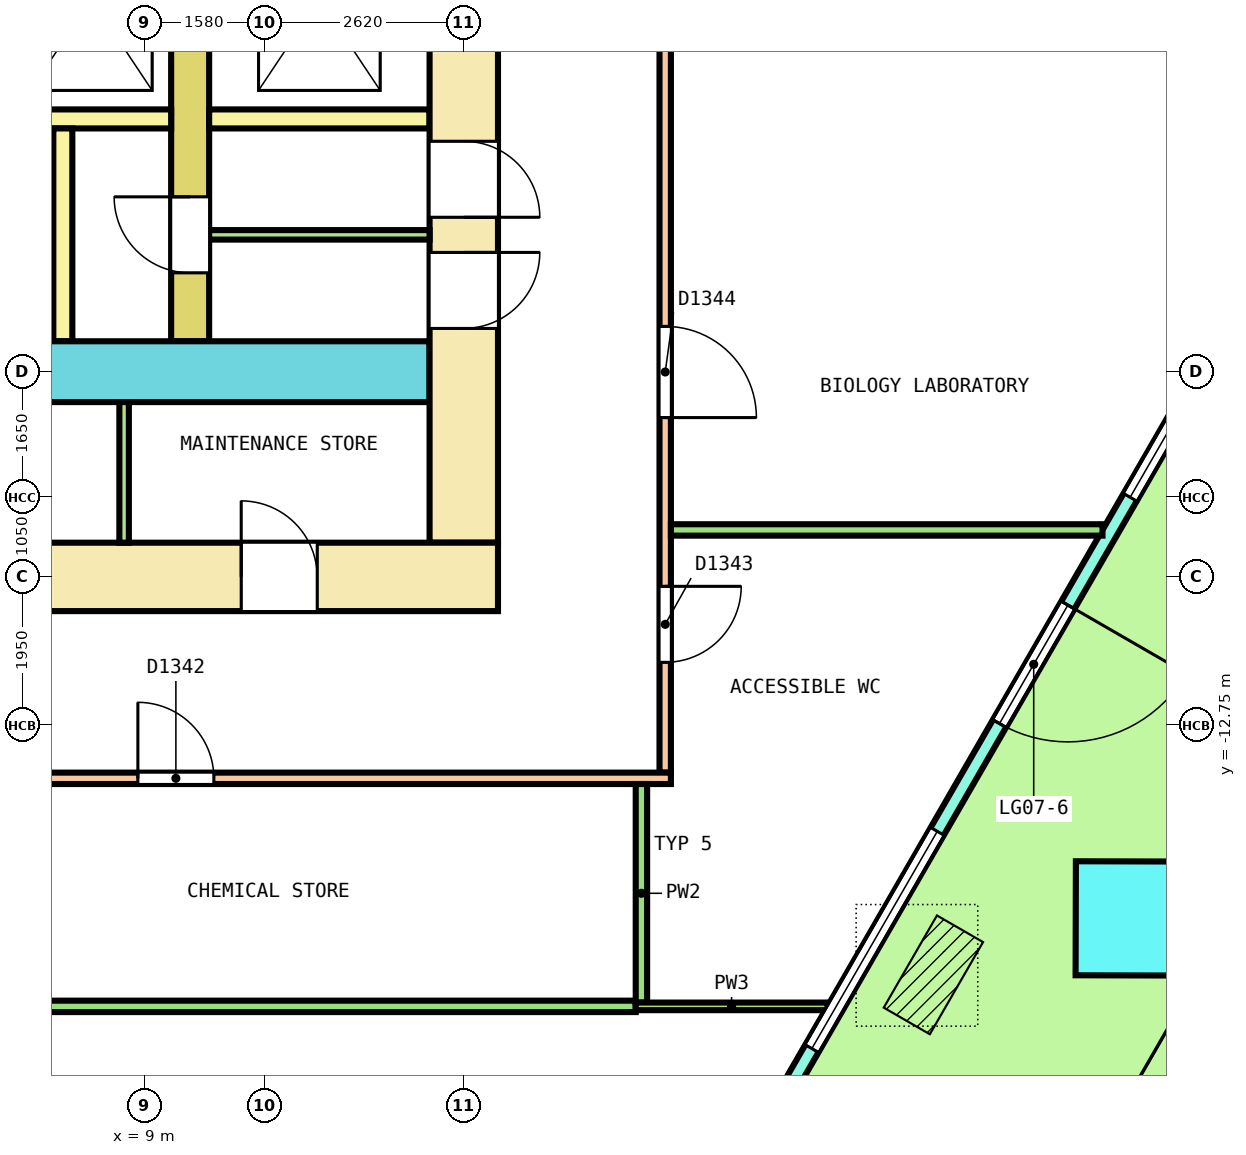
"""IFC4 building model, lengths in metres.
Left out: names, types, materials, properties, quantities, classifications, styles, units other than length and angle.
Written with IfcOpenShell. Run it as: python <this file> out.ifc"""

import sys

from ifc_helpers import new_model, si_unit, direction, frame, frame_2d, origin, origin_2d, place, context, subcontext, project, spatial, polyline, rectangle, outline, extrude, element, fill, save


model = new_model("IFC4")
c1 = context("Model", 3, precision=1e-05, world=origin(), true_north=direction((0.0, 1.0)))
c2 = subcontext(c1, "Body", "Model", "MODEL_VIEW")
j1 = project(units=[si_unit("LENGTHUNIT", "METRE"), si_unit("PLANEANGLEUNIT", "RADIAN")], contexts=[c1])
p1 = place(None, origin())
s1 = spatial("IfcSite", under=j1, at=p1, CompositionType="ELEMENT")
p2 = place(p1, origin())
s2 = spatial("IfcBuilding", under=s1, at=p2, CompositionType="ELEMENT")
p3 = place(p2, frame((0.0, 0.0, 32.2)))
s3 = spatial("IfcBuildingStorey", under=s2, at=p3, CompositionType="ELEMENT", Elevation=32.2)
p4 = place(p3, frame((22.001, -15.293, 0.0), z_axis=(-0.003616759812, -0.006269050341, 0.999973808685), x_axis=(0.501883236828, 0.864905101718, 0.007237514304)))
e1 = element("IfcColumn", 1, at=p4, inside=s3, PredefinedType="COLUMN", context=c2, shape_type="SweptSolid", body=[
    extrude(rectangle(XDim=1.5, YDim=1.5, at=origin_2d()), origin(), (0.0, 0.0, 1.0), 4.05),
])
p5 = place(p3, frame((15.464, -21.016, 0.0), z_axis=(0.0, 0.0, 1.0), x_axis=(0.499999366442, 0.866025769569, 0.0)))
e2 = element("IfcWall", 2, at=p5, inside=s3, PredefinedType="SOLIDWALL", context=c2, shape_type="SweptSolid", body=[
    extrude(outline(polyline([(-0.027, -0.1), (1.023, -0.1), (2.072, -0.1), (3.122, -0.1), (4.171, -0.1), (5.221, -0.1), (6.27, -0.1), (7.32, -0.1), (8.369, -0.1), (9.419, -0.1), (10.468, -0.1), (11.518, -0.1), (12.567, -0.1), (13.617, -0.1), (14.666, -0.1), (15.716, -0.1), (16.765, -0.1), (17.815, -0.1), (18.864, -0.1), (19.914, -0.1), (20.963, -0.1), (20.91, 0.1), (19.865, 0.1), (18.821, 0.1), (17.777, 0.1), (16.733, 0.1), (15.689, 0.1), (14.645, 0.1), (13.601, 0.1), (12.557, 0.1), (11.512, 0.1), (10.468, 0.1), (9.424, 0.1), (8.38, 0.1), (7.336, 0.1), (6.292, 0.1), (5.248, 0.1), (4.203, 0.1), (3.159, 0.1), (2.115, 0.1), (1.071, 0.1), (0.027, 0.1), (-0.027, -0.1)])), origin(), (0.0, 0.0, 1.0), 4.1),
])
p6 = place(p5, frame((0.444, 0.0, 0.1)))
e3 = element("IfcOpeningElement", 3, at=p6, cuts=e2, PredefinedType="OPENING", context=c2, shape_type="SweptSolid", body=[
    extrude(rectangle(XDim=3.3, YDim=2.9, at=frame_2d((1.65, 1.45))), frame((0.0, 0.11, 0.0), z_axis=(0.0, -1.0, 0.0), x_axis=(1.0, 0.0, 0.0)), (0.0, 0.0, 1.0), 0.22),
])
p7 = place(p5, frame((4.631, 0.0, 0.1)))
e4 = element("IfcOpeningElement", 4, at=p7, cuts=e2, PredefinedType="OPENING", context=c2, shape_type="SweptSolid", body=[
    extrude(rectangle(XDim=3.3, YDim=2.9, at=frame_2d((1.65, 1.45))), frame((0.0, 0.11, 0.0), z_axis=(0.0, -1.0, 0.0), x_axis=(1.0, 0.0, 0.0)), (0.0, 0.0, 1.0), 0.22),
])
p8 = place(p5, frame((9.568, 0.0, 0.0)))
e5 = element("IfcOpeningElement", 5, at=p8, cuts=e2, PredefinedType="OPENING", context=c2, shape_type="SweptSolid", body=[
    extrude(rectangle(XDim=1.8, YDim=2.4, at=frame_2d((0.9, 1.2))), frame((0.0, 0.11, 0.0), z_axis=(0.0, -1.0, 0.0), x_axis=(1.0, 0.0, 0.0)), (0.0, 0.0, 1.0), 0.22),
])
p9 = place(p5, frame((9.568, 0.0, 2.55)))
e6 = element("IfcOpeningElement", 6, at=p9, cuts=e2, PredefinedType="OPENING", context=c2, shape_type="SweptSolid", body=[
    extrude(rectangle(XDim=1.8, YDim=0.45, at=frame_2d((0.9, 0.225))), frame((0.0, 0.11, 0.0), z_axis=(0.0, -1.0, 0.0), x_axis=(1.0, 0.0, 0.0)), (0.0, 0.0, 1.0), 0.22),
])
p10 = place(p5, frame((13.006, 0.0, 0.1)))
e7 = element("IfcOpeningElement", 7, at=p10, cuts=e2, PredefinedType="OPENING", context=c2, shape_type="SweptSolid", body=[
    extrude(rectangle(XDim=3.3, YDim=2.9, at=frame_2d((1.65, 1.45))), frame((0.0, 0.11, 0.0), z_axis=(0.0, -1.0, 0.0), x_axis=(1.0, 0.0, 0.0)), (0.0, 0.0, 1.0), 0.22),
])
p11 = place(p5, frame((17.193, 0.0, 0.1)))
e8 = element("IfcOpeningElement", 8, at=p11, cuts=e2, PredefinedType="OPENING", context=c2, shape_type="SweptSolid", body=[
    extrude(rectangle(XDim=3.3, YDim=2.9, at=frame_2d((1.65, 1.45))), frame((0.0, 0.11, 0.0), z_axis=(0.0, -1.0, 0.0), x_axis=(1.0, 0.0, 0.0)), (0.0, 0.0, 1.0), 0.22),
])
p12 = place(p3, frame((-13.65, -10.8, 0.0), z_axis=(0.0, 0.0, 1.0), x_axis=(1.0, 0.0, 0.0)))
e9 = element("IfcWall", 9, at=p12, inside=s3, PredefinedType="SHEAR", context=c2, shape_type="SweptSolid", body=[
    extrude(rectangle(XDim=27.3, YDim=0.9, at=frame_2d((13.65, 0.0))), origin(), (0.0, 0.0, 1.0), 4.1),
])
p13 = place(p12, frame((3.453, 0.0, 0.0)))
e10 = element("IfcOpeningElement", 10, at=p13, cuts=e9, PredefinedType="OPENING", context=c2, shape_type="SweptSolid", body=[
    extrude(rectangle(XDim=1.0, YDim=2.1, at=frame_2d((0.5, 1.05))), frame((0.0, 0.46, 0.0), z_axis=(0.0, -1.0, 0.0), x_axis=(1.0, 0.0, 0.0)), (0.0, 0.0, 1.0), 0.92),
])
p14 = place(p12, frame((9.653, 0.0, 0.0)))
e11 = element("IfcOpeningElement", 11, at=p14, cuts=e9, PredefinedType="OPENING", context=c2, shape_type="SweptSolid", body=[
    extrude(rectangle(XDim=1.0, YDim=2.1, at=frame_2d((0.5, 1.05))), frame((0.0, 0.46, 0.0), z_axis=(0.0, -1.0, 0.0), x_axis=(1.0, 0.0, 0.0)), (0.0, 0.0, 1.0), 0.92),
])
p15 = place(p12, frame((19.872, 0.0, 0.0)))
e12 = element("IfcOpeningElement", 12, at=p15, cuts=e9, PredefinedType="OPENING", context=c2, shape_type="SweptSolid", body=[
    extrude(rectangle(XDim=1.0, YDim=2.1, at=frame_2d((0.5, 1.05))), frame((0.0, 0.46, 0.0), z_axis=(0.0, -1.0, 0.0), x_axis=(1.0, 0.0, 0.0)), (0.0, 0.0, 1.0), 0.92),
])
p16 = place(p12, frame((23.922, 0.0, 0.0)))
e13 = element("IfcOpeningElement", 13, at=p16, cuts=e9, PredefinedType="OPENING", context=c2, shape_type="SweptSolid", body=[
    extrude(rectangle(XDim=1.0, YDim=2.1, at=frame_2d((0.5, 1.05))), frame((0.0, 0.46, 0.0), z_axis=(0.0, -1.0, 0.0), x_axis=(1.0, 0.0, 0.0)), (0.0, 0.0, 1.0), 0.92),
])
p17 = place(p12, frame((15.2, 0.0, 0.0)))
e14 = element("IfcOpeningElement", 14, at=p17, cuts=e9, PredefinedType="OPENING", context=c2, shape_type="SweptSolid", body=[
    extrude(rectangle(XDim=1.2, YDim=2.1, at=frame_2d((0.6, 1.05))), frame((0.0, 0.46, 0.0), z_axis=(0.0, -1.0, 0.0), x_axis=(1.0, 0.0, 0.0)), (0.0, 0.0, 1.0), 0.92),
])
p18 = place(p3, frame((13.2, -10.35, 0.0), z_axis=(0.0, 0.0, 1.0), x_axis=(0.0, 1.0, 0.0)))
e15 = element("IfcWall", 15, at=p18, inside=s3, PredefinedType="SHEAR", context=c2, shape_type="SweptSolid", body=[
    extrude(rectangle(XDim=20.7, YDim=0.9, at=frame_2d((10.35, 0.0))), origin(), (0.0, 0.0, 1.0), 4.1),
])
p19 = place(p18, frame((9.15, 0.0, 0.0)))
e16 = element("IfcOpeningElement", 16, at=p19, cuts=e15, PredefinedType="OPENING", context=c2, shape_type="SweptSolid", body=[
    extrude(rectangle(XDim=2.4, YDim=2.1, at=frame_2d((1.2, 1.05))), frame((0.0, 0.46, 0.0), z_axis=(0.0, -1.0, 0.0), x_axis=(1.0, 0.0, 0.0)), (0.0, 0.0, 1.0), 0.92),
])
p20 = place(p18, frame((16.05, 0.0, 0.0)))
e17 = element("IfcOpeningElement", 17, at=p20, cuts=e15, PredefinedType="OPENING", context=c2, shape_type="SweptSolid", body=[
    extrude(rectangle(XDim=1.2, YDim=2.1, at=frame_2d((0.6, 1.05))), frame((0.0, 0.46, 0.0), z_axis=(0.0, -1.0, 0.0), x_axis=(1.0, 0.0, 0.0)), (0.0, 0.0, 1.0), 0.92),
])
p21 = place(p18, frame((2.819, 0.0, 0.0)))
e18 = element("IfcOpeningElement", 18, at=p21, cuts=e15, PredefinedType="OPENING", context=c2, shape_type="SweptSolid", body=[
    extrude(rectangle(XDim=1.0, YDim=2.1, at=frame_2d((0.5, 1.05))), frame((0.0, 0.46, 0.0), z_axis=(0.0, -1.0, 0.0), x_axis=(1.0, 0.0, 0.0)), (0.0, 0.0, 1.0), 0.92),
])
p22 = place(p18, frame((4.281, 0.0, 0.0)))
e19 = element("IfcOpeningElement", 19, at=p22, cuts=e15, PredefinedType="OPENING", context=c2, shape_type="SweptSolid", body=[
    extrude(rectangle(XDim=1.0, YDim=2.1, at=frame_2d((0.5, 1.05))), frame((0.0, 0.46, 0.0), z_axis=(0.0, -1.0, 0.0), x_axis=(1.0, 0.0, 0.0)), (0.0, 0.0, 1.0), 0.92),
])
p23 = place(p3, frame((-12.75, -8.1, 0.0), z_axis=(0.0, 0.0, 1.0), x_axis=(1.0, 0.0, 0.0)))
e20 = element("IfcWall", 20, at=p23, inside=s3, PredefinedType="SHEAR", context=c2, shape_type="SweptSolid", body=[
    extrude(rectangle(XDim=25.5, YDim=0.8, at=frame_2d((12.75, 0.0))), origin(), (0.0, 0.0, 1.0), 4.1),
])
p24 = place(p23, frame((14.3, 0.0, 0.0)))
e21 = element("IfcOpeningElement", 21, at=p24, cuts=e20, PredefinedType="OPENING", context=c2, shape_type="SweptSolid", body=[
    extrude(rectangle(XDim=1.2, YDim=2.1, at=frame_2d((0.6, 1.05))), frame((0.0, 0.41, 0.0), z_axis=(0.0, -1.0, 0.0), x_axis=(1.0, 0.0, 0.0)), (0.0, 0.0, 1.0), 0.82),
])
p25 = place(p3, frame((9.6, -7.7, 0.0), z_axis=(0.0, 0.0, 1.0), x_axis=(0.0, 1.0, 0.0)))
e22 = element("IfcWall", 22, at=p25, inside=s3, PredefinedType="SHEAR", context=c2, shape_type="SweptSolid", body=[
    extrude(rectangle(XDim=15.4, YDim=0.5, at=frame_2d((7.7, 0.0))), origin(), (0.0, 0.0, 1.0), 4.1),
])
p26 = place(p25, frame((6.5, 0.0, 0.0)))
e23 = element("IfcOpeningElement", 23, at=p26, cuts=e22, PredefinedType="OPENING", context=c2, shape_type="SweptSolid", body=[
    extrude(rectangle(XDim=2.4, YDim=2.1, at=frame_2d((1.2, 1.05))), frame((0.0, 0.26, 0.0), z_axis=(0.0, -1.0, 0.0), x_axis=(1.0, 0.0, 0.0)), (0.0, 0.0, 1.0), 0.52),
])
p27 = place(p25, frame((13.4, 0.0, 0.0)))
e24 = element("IfcOpeningElement", 24, at=p27, cuts=e22, PredefinedType="OPENING", context=c2, shape_type="SweptSolid", body=[
    extrude(rectangle(XDim=1.2, YDim=2.1, at=frame_2d((0.6, 1.05))), frame((0.0, 0.26, 0.0), z_axis=(0.0, -1.0, 0.0), x_axis=(1.0, 0.0, 0.0)), (0.0, 0.0, 1.0), 0.52),
])
p28 = place(p25, frame((0.9, 0.0, 0.0)))
e25 = element("IfcOpeningElement", 25, at=p28, cuts=e22, PredefinedType="OPENING", context=c2, shape_type="SweptSolid", body=[
    extrude(rectangle(XDim=1.0, YDim=2.1, at=frame_2d((0.5, 1.05))), frame((0.0, 0.26, 0.0), z_axis=(0.0, -1.0, 0.0), x_axis=(1.0, 0.0, 0.0)), (0.0, 0.0, 1.0), 0.52),
])
p29 = place(p3, frame((-9.35, -4.775, 0.0), z_axis=(0.0, 0.0, 1.0), x_axis=(1.0, 0.0, 0.0)))
e26 = element("IfcWall", 26, at=p29, inside=s3, PredefinedType="SOLIDWALL", context=c2, shape_type="SweptSolid", body=[
    extrude(rectangle(XDim=18.7, YDim=0.25, at=frame_2d((9.35, 0.0))), origin(), (0.0, 0.0, 1.0), 4.1),
])
p30 = place(p3, frame((9.85, -4.775, 0.0), z_axis=(0.0, 0.0, 1.0), x_axis=(1.0, 0.0, 0.0)))
e27 = element("IfcWall", 27, at=p30, inside=s3, PredefinedType="SOLIDWALL", context=c2, shape_type="SweptSolid", body=[
    extrude(rectangle(XDim=2.9, YDim=0.25, at=frame_2d((1.45, 0.0))), origin(), (0.0, 0.0, 1.0), 4.1),
])
p31 = place(p3, frame((7.925, -7.7, 0.0), z_axis=(0.0, 0.0, 1.0), x_axis=(0.0, 1.0, 0.0)))
e28 = element("IfcWall", 28, at=p31, inside=s3, PredefinedType="SOLIDWALL", context=c2, shape_type="SweptSolid", body=[
    extrude(rectangle(XDim=2.8, YDim=0.25, at=frame_2d((1.4, 0.0))), origin(), (0.0, 0.0, 1.0), 4.1),
])
p32 = place(p3, frame((9.85, -6.3, 0.0), z_axis=(0.0, 0.0, 1.0), x_axis=(1.0, 0.0, 0.0)))
e29 = element("IfcWall", 29, at=p32, inside=s3, PredefinedType="PARTITIONING", context=c2, shape_type="SweptSolid", body=[
    extrude(rectangle(XDim=2.9, YDim=0.125, at=frame_2d((1.45, 0.0))), origin(), (0.0, 0.0, 1.0), 4.1),
])
p33 = place(p3, frame((8.731, -10.35, 0.0), z_axis=(0.0, 0.0, 1.0), x_axis=(0.0, 1.0, 0.0)))
e30 = element("IfcWall", 30, at=p33, inside=s3, PredefinedType="PARTITIONING", context=c2, shape_type="SweptSolid", body=[
    extrude(rectangle(XDim=1.85, YDim=0.125, at=frame_2d((0.925, 0.0))), origin(), (0.0, 0.0, 1.0), 4.1),
])
p34 = place(p3, frame((15.85, -13.375, 0.0), z_axis=(0.0, 0.0, 1.0), x_axis=(0.0, 1.0, 0.0)))
e31 = element("IfcWall", 31, at=p34, inside=s3, PredefinedType="PARTITIONING", context=c2, shape_type="SweptSolid", body=[
    extrude(rectangle(XDim=26.75, YDim=0.15, at=frame_2d((13.375, 0.0))), origin(), (0.0, 0.0, 1.0), 3.05),
])
p35 = place(p34, frame((14.212, 0.0, 0.0)))
e32 = element("IfcOpeningElement", 32, at=p35, cuts=e31, PredefinedType="OPENING", context=c2, shape_type="SweptSolid", body=[
    extrude(rectangle(XDim=1.0, YDim=2.1, at=frame_2d((0.5, 1.05))), frame((0.0, 0.085, 0.0), z_axis=(0.0, -1.0, 0.0), x_axis=(1.0, 0.0, 0.0)), (0.0, 0.0, 1.0), 0.17),
])
p36 = place(p34, frame((21.958, 0.0, 0.0)))
e33 = element("IfcOpeningElement", 33, at=p36, cuts=e31, PredefinedType="OPENING", context=c2, shape_type="SweptSolid", body=[
    extrude(rectangle(XDim=1.2, YDim=2.1, at=frame_2d((0.6, 1.05))), frame((0.0, 0.085, 0.0), z_axis=(0.0, -1.0, 0.0), x_axis=(1.0, 0.0, 0.0)), (0.0, 0.0, 1.0), 0.17),
])
p37 = place(p34, frame((24.743, 0.0, 0.0)))
e34 = element("IfcOpeningElement", 34, at=p37, cuts=e31, PredefinedType="OPENING", context=c2, shape_type="SweptSolid", body=[
    extrude(rectangle(XDim=1.0, YDim=2.1, at=frame_2d((0.5, 1.05))), frame((0.0, 0.085, 0.0), z_axis=(0.0, -1.0, 0.0), x_axis=(1.0, 0.0, 0.0)), (0.0, 0.0, 1.0), 0.17),
])
p38 = place(p34, frame((1.451, 0.0, 0.0)))
e35 = element("IfcOpeningElement", 35, at=p38, cuts=e31, PredefinedType="OPENING", context=c2, shape_type="SweptSolid", body=[
    extrude(rectangle(XDim=1.0, YDim=2.1, at=frame_2d((0.5, 1.05))), frame((0.0, 0.085, 0.0), z_axis=(0.0, -1.0, 0.0), x_axis=(1.0, 0.0, 0.0)), (0.0, 0.0, 1.0), 0.17),
])
p39 = place(p34, frame((4.671, 0.0, 0.0)))
e36 = element("IfcOpeningElement", 36, at=p39, cuts=e31, PredefinedType="OPENING", context=c2, shape_type="SweptSolid", body=[
    extrude(rectangle(XDim=1.2, YDim=2.1, at=frame_2d((0.6, 1.05))), frame((0.0, 0.085, 0.0), z_axis=(0.0, -1.0, 0.0), x_axis=(1.0, 0.0, 0.0)), (0.0, 0.0, 1.0), 0.17),
])
p40 = place(p3, frame((-15.925, -13.45, 0.0), z_axis=(0.0, 0.0, 1.0), x_axis=(1.0, 0.0, 0.0)))
e37 = element("IfcWall", 37, at=p40, inside=s3, PredefinedType="PARTITIONING", context=c2, shape_type="SweptSolid", body=[
    extrude(rectangle(XDim=31.85, YDim=0.15, at=frame_2d((15.925, 0.0))), origin(), (0.0, 0.0, 1.0), 3.05),
])
p41 = place(p40, frame((0.828, 0.0, 0.0)))
e38 = element("IfcOpeningElement", 38, at=p41, cuts=e37, PredefinedType="OPENING", context=c2, shape_type="SweptSolid", body=[
    extrude(rectangle(XDim=1.0, YDim=2.1, at=frame_2d((0.5, 1.05))), frame((0.0, 0.085, 0.0), z_axis=(0.0, -1.0, 0.0), x_axis=(1.0, 0.0, 0.0)), (0.0, 0.0, 1.0), 0.17),
])
p42 = place(p40, frame((5.017, 0.0, 0.0)))
e39 = element("IfcOpeningElement", 39, at=p42, cuts=e37, PredefinedType="OPENING", context=c2, shape_type="SweptSolid", body=[
    extrude(rectangle(XDim=1.0, YDim=2.1, at=frame_2d((0.5, 1.05))), frame((0.0, 0.085, 0.0), z_axis=(0.0, -1.0, 0.0), x_axis=(1.0, 0.0, 0.0)), (0.0, 0.0, 1.0), 0.17),
])
p43 = place(p40, frame((17.861, 0.0, 0.0)))
e40 = element("IfcOpeningElement", 40, at=p43, cuts=e37, PredefinedType="OPENING", context=c2, shape_type="SweptSolid", body=[
    extrude(rectangle(XDim=1.0, YDim=2.1, at=frame_2d((0.5, 1.05))), frame((0.0, 0.085, 0.0), z_axis=(0.0, -1.0, 0.0), x_axis=(1.0, 0.0, 0.0)), (0.0, 0.0, 1.0), 0.17),
])
p44 = place(p40, frame((24.837, 0.0, 0.0)))
e41 = element("IfcOpeningElement", 41, at=p44, cuts=e37, PredefinedType="OPENING", context=c2, shape_type="SweptSolid", body=[
    extrude(rectangle(XDim=1.0, YDim=2.1, at=frame_2d((0.5, 1.05))), frame((0.0, 0.085, 0.0), z_axis=(0.0, -1.0, 0.0), x_axis=(1.0, 0.0, 0.0)), (0.0, 0.0, 1.0), 0.17),
])
p45 = place(p3, frame((15.925, -10.182, 0.0), z_axis=(0.0, 0.0, 1.0), x_axis=(1.0, 0.0, 0.0)))
e42 = element("IfcWall", 42, at=p45, inside=s3, PredefinedType="PARTITIONING", context=c2, shape_type="SweptSolid", body=[
    extrude(rectangle(XDim=5.678, YDim=0.15, at=frame_2d((2.839, 0.0))), origin(), (0.0, 0.0, 1.0), 3.05),
])
p46 = place(p3, frame((-5.647, -16.45, 0.0), z_axis=(0.0, 0.0, 1.0), x_axis=(1.0, 0.0, 0.0)))
e43 = element("IfcWall", 43, at=p46, inside=s3, PredefinedType="PARTITIONING", context=c2, shape_type="SweptSolid", body=[
    extrude(rectangle(XDim=21.109, YDim=0.15, at=frame_2d((10.555, 0.0))), origin(), (0.0, 0.0, 1.0), 3.05),
])
p47 = place(p3, frame((15.537, -16.4, 0.0), z_axis=(0.0, 0.0, 1.0), x_axis=(0.0, 1.0, 0.0)))
e44 = element("IfcWall", 44, at=p47, inside=s3, PredefinedType="PARTITIONING", context=c2, shape_type="SweptSolid", body=[
    extrude(rectangle(XDim=2.875, YDim=0.15, at=frame_2d((1.438, 0.0))), origin(), (0.0, 0.0, 1.0), 3.05),
])
p48 = place(p3, frame((15.462, -16.45, 0.0), z_axis=(0.0, 0.0, 1.0), x_axis=(1.0, 0.0, 0.0)))
e45 = element("IfcWall", 45, at=p48, inside=s3, PredefinedType="PARTITIONING", context=c2, shape_type="SweptSolid", body=[
    extrude(rectangle(XDim=2.522, YDim=0.1, at=frame_2d((1.261, 0.0))), origin(), (0.0, 0.0, 1.0), 3.05),
])
p49 = place(p7, origin())
e46 = element("IfcWindow", 46, at=p49, inside=s3, PartitioningType="SINGLE_PANEL", PredefinedType="WINDOW", context=c2, shape_type="SweptSolid", body=[
    extrude(rectangle(XDim=3.3, YDim=2.9, at=frame_2d((1.65, 1.45))), frame((0.0, 0.03, 0.0), z_axis=(0.0, -1.0, 0.0), x_axis=(1.0, 0.0, 0.0)), (0.0, 0.0, 1.0), 0.06),
])
fill(e4, e46)
p50 = place(p8, origin())
e47 = element("IfcDoor", 47, at=p50, inside=s3, OperationType="DOUBLE_DOOR_SINGLE_SWING", PredefinedType="DOOR", context=c2, shape_type="SweptSolid", body=[
    extrude(rectangle(XDim=1.8, YDim=2.4, at=frame_2d((0.9, 1.2))), frame((0.0, 0.025, 0.0), z_axis=(0.0, -1.0, 0.0), x_axis=(1.0, 0.0, 0.0)), (0.0, 0.0, 1.0), 0.05),
])
fill(e5, e47)
p51 = place(p9, origin())
e48 = element("IfcWindow", 48, at=p51, inside=s3, PartitioningType="SINGLE_PANEL", PredefinedType="WINDOW", context=c2, shape_type="SweptSolid", body=[
    extrude(rectangle(XDim=1.8, YDim=0.45, at=frame_2d((0.9, 0.225))), frame((0.0, 0.03, 0.0), z_axis=(0.0, -1.0, 0.0), x_axis=(1.0, 0.0, 0.0)), (0.0, 0.0, 1.0), 0.06),
])
fill(e6, e48)
p52 = place(p10, origin())
e49 = element("IfcWindow", 49, at=p52, inside=s3, PartitioningType="SINGLE_PANEL", PredefinedType="WINDOW", context=c2, shape_type="SweptSolid", body=[
    extrude(rectangle(XDim=3.3, YDim=2.9, at=frame_2d((1.65, 1.45))), frame((0.0, 0.03, 0.0), z_axis=(0.0, -1.0, 0.0), x_axis=(1.0, 0.0, 0.0)), (0.0, 0.0, 1.0), 0.06),
])
fill(e7, e49)
p53 = place(p28, origin())
e50 = element("IfcDoor", 50, at=p53, inside=s3, OperationType="SINGLE_SWING_RIGHT", PredefinedType="DOOR", context=c2, shape_type="SweptSolid", body=[
    extrude(rectangle(XDim=1.0, YDim=2.1, at=frame_2d((0.5, 1.05))), frame((0.0, 0.2, 0.0), z_axis=(0.0, -1.0, 0.0), x_axis=(1.0, 0.0, 0.0)), (0.0, 0.0, 1.0), 0.4),
])
fill(e25, e50)
p54 = place(p21, origin())
e51 = element("IfcDoor", 51, at=p54, inside=s3, OperationType="SINGLE_SWING_LEFT", PredefinedType="DOOR", context=c2, shape_type="SweptSolid", body=[
    extrude(rectangle(XDim=1.0, YDim=2.1, at=frame_2d((0.5, 1.05))), frame((0.0, 0.3, 0.0), z_axis=(0.0, -1.0, 0.0), x_axis=(1.0, 0.0, 0.0)), (0.0, 0.0, 1.0), 0.6),
])
fill(e18, e51)
p55 = place(p22, origin())
e52 = element("IfcDoor", 52, at=p55, inside=s3, OperationType="SINGLE_SWING_RIGHT", PredefinedType="DOOR", context=c2, shape_type="SweptSolid", body=[
    extrude(rectangle(XDim=1.0, YDim=2.1, at=frame_2d((0.5, 1.05))), frame((0.0, 0.3, 0.0), z_axis=(0.0, -1.0, 0.0), x_axis=(1.0, 0.0, 0.0)), (0.0, 0.0, 1.0), 0.6),
])
fill(e19, e52)
p56 = place(p16, origin())
e53 = element("IfcDoor", 53, at=p56, inside=s3, OperationType="SINGLE_SWING_RIGHT", PredefinedType="DOOR", context=c2, shape_type="SweptSolid", body=[
    extrude(rectangle(XDim=1.0, YDim=2.1, at=frame_2d((0.5, 1.05))), frame((0.0, 0.3, 0.0), z_axis=(0.0, -1.0, 0.0), x_axis=(1.0, 0.0, 0.0)), (0.0, 0.0, 1.0), 0.6),
])
fill(e13, e53)
p57 = place(p44, origin())
e54 = element("IfcDoor", 54, at=p57, inside=s3, OperationType="SINGLE_SWING_LEFT", PredefinedType="DOOR", context=c2, shape_type="SweptSolid", body=[
    extrude(rectangle(XDim=1.0, YDim=2.1, at=frame_2d((0.5, 1.05))), frame((0.0, 0.025, 0.0), z_axis=(0.0, -1.0, 0.0), x_axis=(1.0, 0.0, 0.0)), (0.0, 0.0, 1.0), 0.05),
])
fill(e41, e54)
p58 = place(p38, origin())
e55 = element("IfcDoor", 55, at=p58, inside=s3, OperationType="SINGLE_SWING_RIGHT", PredefinedType="DOOR", context=c2, shape_type="SweptSolid", body=[
    extrude(rectangle(XDim=1.0, YDim=2.1, at=frame_2d((0.5, 1.05))), frame((0.0, 0.025, 0.0), z_axis=(0.0, -1.0, 0.0), x_axis=(1.0, 0.0, 0.0)), (0.0, 0.0, 1.0), 0.05),
])
fill(e35, e55)
p59 = place(p39, origin())
e56 = element("IfcDoor", 56, at=p59, inside=s3, OperationType="DOUBLE_DOOR_SINGLE_SWING", PredefinedType="DOOR", context=c2, shape_type="SweptSolid", body=[
    extrude(rectangle(XDim=1.2, YDim=2.1, at=frame_2d((0.6, 1.05))), frame((0.0, 0.025, 0.0), z_axis=(0.0, -1.0, 0.0), x_axis=(1.0, 0.0, 0.0)), (0.0, 0.0, 1.0), 0.05),
])
fill(e36, e56)
save(model, sys.argv[1])
